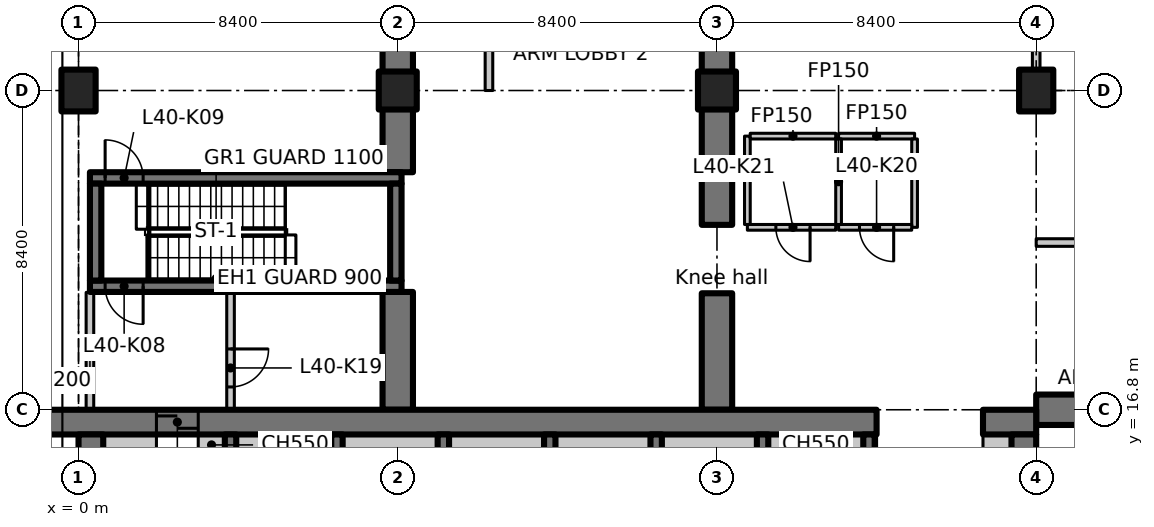
"""IFC4 building model, lengths in metres.
Left out: names, types, materials, properties, quantities, classifications, styles, units other than length and angle.
Written with IfcOpenShell. Run it as: python <this file> out.ifc"""

import sys

from ifc_helpers import new_model, si_unit, direction, frame, frame_2d, origin, origin_2d, place, context, subcontext, project, spatial, polyline, rectangle, outline, extrude, element, fill, save


model = new_model("IFC4")
c1 = context("Model", 3, precision=1e-05, world=origin(), true_north=direction((0.0, 1.0)))
c2 = subcontext(c1, "Body", "Model", "MODEL_VIEW")
j1 = project(units=[si_unit("LENGTHUNIT", "METRE"), si_unit("PLANEANGLEUNIT", "RADIAN")], contexts=[c1])
p1 = place(None, origin())
s1 = spatial("IfcSite", under=j1, at=p1, CompositionType="ELEMENT")
p2 = place(p1, origin())
s2 = spatial("IfcBuilding", under=s1, at=p2, CompositionType="ELEMENT")
p3 = place(p2, frame((0.0, 0.0, 162.0)))
s3 = spatial("IfcBuildingStorey", under=s2, at=p3, CompositionType="ELEMENT", Elevation=162.0)
p4 = place(p3, frame((0.0, 25.2, 0.0), z_axis=(0.0, 0.0, 1.0), x_axis=(1.0, 0.0, 0.0)))
e1 = element("IfcColumn", 1, at=p4, inside=s3, PredefinedType="COLUMN", context=c2, shape_type="SweptSolid", body=[
    extrude(rectangle(XDim=0.9, YDim=1.1, at=origin_2d()), origin(), (0.0, 0.0, 1.0), 4.55),
])
for number, where, z_axis, x_axis in (
    (2, (8.4, 25.2, 0.0), (0.0, 0.0, 1.0), (1.0, 0.0, 0.0)),
    (3, (16.8, 25.2, 0.0), (0.0, 0.0, 1.0), (1.0, 0.0, 0.0)),
):
    element("IfcColumn", number, at=place(p3, frame(where, z_axis=z_axis, x_axis=x_axis)), inside=s3, PredefinedType="COLUMN", context=c2, shape_type="SweptSolid", body=[
        extrude(rectangle(XDim=1.0, YDim=1.0, at=origin_2d()), origin(), (0.0, 0.0, 1.0), 4.55),
    ])
p5 = place(p3, frame((25.2, 25.2, 0.0), z_axis=(0.0, 0.0, 1.0), x_axis=(1.0, 0.0, 0.0)))
e4 = element("IfcColumn", 4, at=p5, inside=s3, PredefinedType="COLUMN", context=c2, shape_type="SweptSolid", body=[
    extrude(rectangle(XDim=0.9, YDim=1.1, at=origin_2d()), origin(), (0.0, 0.0, 1.0), 4.55),
])
p6 = place(p3, frame((25.2, 16.8, 0.0), z_axis=(0.0, 0.0, 1.0), x_axis=(1.0, 0.0, 0.0)))
e5 = element("IfcWall", 5, at=p6, inside=s3, PredefinedType="SHEAR", context=c2, shape_type="SweptSolid", body=[
    extrude(rectangle(XDim=3.065, YDim=0.8, at=frame_2d((1.532, 0.0))), origin(), (0.0, 0.0, 1.0), 4.55),
])
p7 = place(p3, frame((8.4, 16.8, 0.0), z_axis=(0.0, 0.0, 1.0), x_axis=(0.0, 1.0, 0.0)))
e6 = element("IfcWall", 6, at=p7, inside=s3, PredefinedType="SHEAR", context=c2, shape_type="SweptSolid", body=[
    extrude(rectangle(XDim=3.1, YDim=0.8, at=frame_2d((1.55, 0.0))), origin(), (0.0, 0.0, 1.0), 4.55),
])
p8 = place(p3, frame((8.4, 23.05, 0.0), z_axis=(0.0, 0.0, 1.0), x_axis=(0.0, 1.0, 0.0)))
e7 = element("IfcWall", 7, at=p8, inside=s3, PredefinedType="SHEAR", context=c2, shape_type="SweptSolid", body=[
    extrude(rectangle(XDim=1.68, YDim=0.8, at=frame_2d((0.84, 0.0))), origin(), (0.0, 0.0, 1.0), 4.55),
])
p9 = place(p3, frame((8.4, 25.67, 0.0), z_axis=(0.0, 0.0, 1.0), x_axis=(0.0, 1.0, 0.0)))
e8 = element("IfcWall", 8, at=p9, inside=s3, PredefinedType="SHEAR", context=c2, shape_type="SweptSolid", body=[
    extrude(rectangle(XDim=2.83, YDim=0.8, at=frame_2d((1.415, 0.0))), origin(), (0.0, 0.0, 1.0), 4.55),
])
for number, where, z_axis, x_axis in (
    (9, (16.8, 16.8, 0.0), (0.0, 0.0, 1.0), (0.0, 1.0, 0.0)),
    (10, (16.8, 21.665, 0.0), (0.0, 0.0, 1.0), (0.0, 1.0, 0.0)),
):
    element("IfcWall", number, at=place(p3, frame(where, z_axis=z_axis, x_axis=x_axis)), inside=s3, PredefinedType="SHEAR", context=c2, shape_type="SweptSolid", body=[
        extrude(rectangle(XDim=3.065, YDim=0.8, at=frame_2d((1.532, 0.0))), origin(), (0.0, 0.0, 1.0), 4.55),
    ])
p10 = place(p3, frame((16.8, 25.67, 0.0), z_axis=(0.0, 0.0, 1.0), x_axis=(0.0, 1.0, 0.0)))
e11 = element("IfcWall", 11, at=p10, inside=s3, PredefinedType="SHEAR", context=c2, shape_type="SweptSolid", body=[
    extrude(rectangle(XDim=1.53, YDim=0.8, at=frame_2d((0.765, 0.0))), origin(), (0.0, 0.0, 1.0), 4.55),
])
p11 = place(p3, frame((-1.1, 16.475, 0.0), z_axis=(0.0, 0.0, 1.0), x_axis=(1.0, 0.0, 0.0)))
e12 = element("IfcWall", 12, at=p11, inside=s3, PredefinedType="SHEAR", context=c2, shape_type="SweptSolid", body=[
    extrude(rectangle(XDim=22.1, YDim=0.65, at=frame_2d((11.05, 0.0))), origin(), (0.0, 0.0, 1.0), 4.55),
])
p12 = place(p11, frame((3.15, 0.0, 0.0)))
e13 = element("IfcOpeningElement", 13, at=p12, cuts=e12, PredefinedType="OPENING", context=c2, shape_type="SweptSolid", body=[
    extrude(rectangle(XDim=1.1, YDim=2.3, at=frame_2d((0.55, 1.15))), frame((0.0, 0.335, 0.0), z_axis=(0.0, -1.0, 0.0), x_axis=(1.0, 0.0, 0.0)), (0.0, 0.0, 1.0), 0.67),
])
p13 = place(p3, frame((23.8, 16.475, 0.0), z_axis=(0.0, 0.0, 1.0), x_axis=(1.0, 0.0, 0.0)))
e14 = element("IfcWall", 14, at=p13, inside=s3, PredefinedType="SHEAR", context=c2, shape_type="SweptSolid", body=[
    extrude(rectangle(XDim=1.4, YDim=0.65, at=frame_2d((0.7, 0.0))), origin(), (0.0, 0.0, 1.0), 4.55),
])
p14 = place(p3, frame((0.325, 7.286, 0.0), z_axis=(0.0, 0.0, 1.0), x_axis=(0.0, 1.0, 0.0)))
e15 = element("IfcWall", 15, at=p14, inside=s3, PredefinedType="SHEAR", context=c2, shape_type="SweptSolid", body=[
    extrude(rectangle(XDim=8.864, YDim=0.65, at=frame_2d((4.432, 0.0))), origin(), (0.0, 0.0, 1.0), 4.55),
])
p15 = place(p3, frame((24.875, 12.6, 0.0), z_axis=(0.0, 0.0, 1.0), x_axis=(0.0, 1.0, 0.0)))
e16 = element("IfcWall", 16, at=p15, inside=s3, PredefinedType="SHEAR", context=c2, shape_type="SweptSolid", body=[
    extrude(rectangle(XDim=3.55, YDim=0.65, at=frame_2d((1.775, 0.0))), origin(), (0.0, 0.0, 1.0), 4.55),
])
p16 = place(p3, frame((0.65, 15.875, 0.0), z_axis=(0.0, 0.0, 1.0), x_axis=(1.0, 0.0, 0.0)))
e17 = element("IfcWall", 17, at=p16, inside=s3, PredefinedType="PARTITIONING", context=c2, shape_type="SweptSolid", body=[
    extrude(rectangle(XDim=1.4, YDim=0.55, at=frame_2d((0.7, 0.0))), origin(), (0.0, 0.0, 1.0), 4.55),
])
p17 = place(p3, frame((23.8, 15.875, 0.0), z_axis=(0.0, 0.0, 1.0), x_axis=(1.0, 0.0, 0.0)))
e18 = element("IfcWall", 18, at=p17, inside=s3, PredefinedType="PARTITIONING", context=c2, shape_type="SweptSolid", body=[
    extrude(rectangle(XDim=0.75, YDim=0.55, at=frame_2d((0.375, 0.0))), origin(), (0.0, 0.0, 1.0), 4.55),
])
for number, where, z_axis, x_axis in (
    (19, (4.0, 12.95, 0.0), (0.0, 0.0, 1.0), (0.0, 1.0, 0.0)),
    (20, (6.8, 12.95, 0.0), (0.0, 0.0, 1.0), (0.0, 1.0, 0.0)),
    (21, (9.6, 12.95, 0.0), (0.0, 0.0, 1.0), (0.0, 1.0, 0.0)),
    (22, (12.4, 12.95, 0.0), (0.0, 0.0, 1.0), (0.0, 1.0, 0.0)),
    (23, (15.2, 12.95, 0.0), (0.0, 0.0, 1.0), (0.0, 1.0, 0.0)),
    (24, (18.0, 12.95, 0.0), (0.0, 0.0, 1.0), (0.0, 1.0, 0.0)),
    (25, (20.8, 12.95, 0.0), (0.0, 0.0, 1.0), (0.0, 1.0, 0.0)),
):
    element("IfcWall", number, at=place(p3, frame(where, z_axis=z_axis, x_axis=x_axis)), inside=s3, PredefinedType="SHEAR", context=c2, shape_type="SweptSolid", body=[
        extrude(rectangle(XDim=3.2, YDim=0.3, at=frame_2d((1.6, 0.0))), origin(), (0.0, 0.0, 1.0), 4.55),
    ])
p18 = place(p3, frame((8.5, 20.05, 0.0), z_axis=(0.0, 0.0, 1.0), x_axis=(-1.0, 0.0, 0.0)))
e26 = element("IfcWall", 26, at=p18, inside=s3, PredefinedType="SHEAR", context=c2, shape_type="SweptSolid", body=[
    extrude(rectangle(XDim=8.2, YDim=0.3, at=frame_2d((4.1, 0.0))), origin(), (0.0, 0.0, 1.0), 4.55),
])
p19 = place(p18, frame((6.8, 0.0, 0.0)))
e27 = element("IfcOpeningElement", 27, at=p19, cuts=e26, PredefinedType="OPENING", context=c2, shape_type="SweptSolid", body=[
    extrude(rectangle(XDim=1.0, YDim=2.1, at=frame_2d((0.5, 1.05))), frame((0.0, 0.16, 0.0), z_axis=(0.0, -1.0, 0.0), x_axis=(1.0, 0.0, 0.0)), (0.0, 0.0, 1.0), 0.32),
])
p20 = place(p3, frame((0.3, 22.9, 0.0), z_axis=(0.0, 0.0, 1.0), x_axis=(1.0, 0.0, 0.0)))
e28 = element("IfcWall", 28, at=p20, inside=s3, PredefinedType="SHEAR", context=c2, shape_type="SweptSolid", body=[
    extrude(rectangle(XDim=8.2, YDim=0.3, at=frame_2d((4.1, 0.0))), origin(), (0.0, 0.0, 1.0), 4.55),
])
p21 = place(p20, frame((0.4, 0.0, 0.0)))
e29 = element("IfcOpeningElement", 29, at=p21, cuts=e28, PredefinedType="OPENING", context=c2, shape_type="SweptSolid", body=[
    extrude(rectangle(XDim=1.0, YDim=2.1, at=frame_2d((0.5, 1.05))), frame((0.0, 0.16, 0.0), z_axis=(0.0, -1.0, 0.0), x_axis=(1.0, 0.0, 0.0)), (0.0, 0.0, 1.0), 0.32),
])
for number, where, z_axis, x_axis in (
    (30, (0.45, 20.2, 0.0), (0.0, 0.0, 1.0), (0.0, 1.0, 0.0)),
    (31, (8.35, 20.2, 0.0), (0.0, 0.0, 1.0), (0.0, 1.0, 0.0)),
):
    element("IfcWall", number, at=place(p3, frame(where, z_axis=z_axis, x_axis=x_axis)), inside=s3, PredefinedType="SHEAR", context=c2, shape_type="SweptSolid", body=[
        extrude(rectangle(XDim=2.55, YDim=0.3, at=frame_2d((1.275, 0.0))), origin(), (0.0, 0.0, 1.0), 4.55),
    ])
p22 = place(p3, frame((0.3, 16.812, 0.0), z_axis=(0.0, 0.0, 1.0), x_axis=(0.0, 1.0, 0.0)))
e32 = element("IfcWall", 32, at=p22, inside=s3, PredefinedType="PARTITIONING", context=c2, shape_type="SweptSolid", body=[
    extrude(rectangle(XDim=3.076, YDim=0.2, at=frame_2d((1.538, 0.0))), origin(), (0.0, 0.0, 1.0), 4.18),
])
p23 = place(p3, frame((4.0, 19.888, 0.0), z_axis=(0.0, 0.0, 1.0), x_axis=(0.0, -1.0, 0.0)))
e33 = element("IfcWall", 33, at=p23, inside=s3, PredefinedType="PARTITIONING", context=c2, shape_type="SweptSolid", body=[
    extrude(rectangle(XDim=3.076, YDim=0.2, at=frame_2d((1.538, 0.0))), origin(), (0.0, 0.0, 1.0), 4.55),
])
p24 = place(p23, frame((1.488, 0.0, 0.0)))
e34 = element("IfcOpeningElement", 34, at=p24, cuts=e33, PredefinedType="OPENING", context=c2, shape_type="SweptSolid", body=[
    extrude(rectangle(XDim=1.0, YDim=2.1, at=frame_2d((0.5, 1.05))), frame((0.0, 0.11, 0.0), z_axis=(0.0, -1.0, 0.0), x_axis=(1.0, 0.0, 0.0)), (0.0, 0.0, 1.0), 0.22),
])
p25 = place(p3, frame((20.0, 24.0, 0.0), z_axis=(0.0, 0.0, 1.0), x_axis=(1.0, 0.0, 0.0)))
e35 = element("IfcWall", 35, at=p25, inside=s3, PredefinedType="PARTITIONING", context=c2, shape_type="SweptSolid", body=[
    extrude(rectangle(XDim=2.0, YDim=0.15, at=frame_2d((1.0, 0.0))), origin(), (0.0, 0.0, 1.0), 4.55),
])
p26 = place(p3, frame((22.0, 23.925, 0.0), z_axis=(0.0, 0.0, 1.0), x_axis=(0.0, -1.0, 0.0)))
e36 = element("IfcWall", 36, at=p26, inside=s3, PredefinedType="PARTITIONING", context=c2, shape_type="SweptSolid", body=[
    extrude(rectangle(XDim=2.325, YDim=0.15, at=frame_2d((1.163, 0.0))), origin(), (0.0, 0.0, 1.0), 4.55),
])
p27 = place(p3, frame((21.925, 21.6, 0.0), z_axis=(0.0, 0.0, 1.0), x_axis=(-1.0, 0.0, 0.0)))
e37 = element("IfcWall", 37, at=p27, inside=s3, PredefinedType="PARTITIONING", context=c2, shape_type="SweptSolid", body=[
    extrude(rectangle(XDim=1.925, YDim=0.15, at=frame_2d((0.962, 0.0))), origin(), (0.0, 0.0, 1.0), 4.55),
])
p28 = place(p27, frame((0.475, 0.0, 0.0)))
e38 = element("IfcOpeningElement", 38, at=p28, cuts=e37, PredefinedType="OPENING", context=c2, shape_type="SweptSolid", body=[
    extrude(rectangle(XDim=0.9, YDim=2.1, at=frame_2d((0.45, 1.05))), frame((0.0, 0.085, 0.0), z_axis=(0.0, -1.0, 0.0), x_axis=(1.0, 0.0, 0.0)), (0.0, 0.0, 1.0), 0.17),
])
p29 = place(p3, frame((20.0, 21.675, 0.0), z_axis=(0.0, 0.0, 1.0), x_axis=(0.0, 1.0, 0.0)))
e39 = element("IfcWall", 39, at=p29, inside=s3, PredefinedType="PARTITIONING", context=c2, shape_type="SweptSolid", body=[
    extrude(rectangle(XDim=2.25, YDim=0.15, at=frame_2d((1.125, 0.0))), origin(), (0.0, 0.0, 1.0), 4.55),
])
p30 = place(p3, frame((19.925, 21.6, 0.0), z_axis=(0.0, 0.0, 1.0), x_axis=(-1.0, 0.0, 0.0)))
e40 = element("IfcWall", 40, at=p30, inside=s3, PredefinedType="PARTITIONING", context=c2, shape_type="SweptSolid", body=[
    extrude(rectangle(XDim=2.325, YDim=0.15, at=frame_2d((1.163, 0.0))), origin(), (0.0, 0.0, 1.0), 4.55),
])
p31 = place(p30, frame((0.675, 0.0, 0.0)))
e41 = element("IfcOpeningElement", 41, at=p31, cuts=e40, PredefinedType="OPENING", context=c2, shape_type="SweptSolid", body=[
    extrude(rectangle(XDim=0.9, YDim=2.1, at=frame_2d((0.45, 1.05))), frame((0.0, 0.085, 0.0), z_axis=(0.0, -1.0, 0.0), x_axis=(1.0, 0.0, 0.0)), (0.0, 0.0, 1.0), 0.17),
])
p32 = place(p3, frame((17.6, 21.675, 0.0), z_axis=(0.0, 0.0, 1.0), x_axis=(0.0, 1.0, 0.0)))
e42 = element("IfcWall", 42, at=p32, inside=s3, PredefinedType="PARTITIONING", context=c2, shape_type="SweptSolid", body=[
    extrude(rectangle(XDim=2.325, YDim=0.15, at=frame_2d((1.163, 0.0))), origin(), (0.0, 0.0, 1.0), 4.55),
])
p33 = place(p3, frame((17.675, 24.0, 0.0), z_axis=(0.0, 0.0, 1.0), x_axis=(1.0, 0.0, 0.0)))
e43 = element("IfcWall", 43, at=p33, inside=s3, PredefinedType="PARTITIONING", context=c2, shape_type="SweptSolid", body=[
    extrude(rectangle(XDim=2.25, YDim=0.15, at=frame_2d((1.125, 0.0))), origin(), (0.0, 0.0, 1.0), 4.55),
])
p34 = place(p3, frame((3.15, 15.875, 0.0), z_axis=(0.0, 0.0, 1.0), x_axis=(1.0, 0.0, 0.0)))
e44 = element("IfcWall", 44, at=p34, inside=s3, PredefinedType="PARTITIONING", context=c2, shape_type="SweptSolid", body=[
    extrude(rectangle(XDim=0.7, YDim=0.55, at=frame_2d((0.35, 0.0))), origin(), (0.0, 0.0, 1.0), 4.55),
])
for number, where, z_axis, x_axis in (
    (45, (4.15, 15.875, 0.0), (0.0, 0.0, 1.0), (1.0, 0.0, 0.0)),
    (46, (6.95, 15.875, 0.0), (0.0, 0.0, 1.0), (1.0, 0.0, 0.0)),
    (47, (9.75, 15.875, 0.0), (0.0, 0.0, 1.0), (1.0, 0.0, 0.0)),
    (48, (12.55, 15.875, 0.0), (0.0, 0.0, 1.0), (1.0, 0.0, 0.0)),
    (49, (15.35, 15.875, 0.0), (0.0, 0.0, 1.0), (1.0, 0.0, 0.0)),
    (50, (18.15, 15.875, 0.0), (0.0, 0.0, 1.0), (1.0, 0.0, 0.0)),
):
    element("IfcWall", number, at=place(p3, frame(where, z_axis=z_axis, x_axis=x_axis)), inside=s3, PredefinedType="PARTITIONING", context=c2, shape_type="SweptSolid", body=[
        extrude(rectangle(XDim=2.5, YDim=0.55, at=frame_2d((1.25, 0.0))), origin(), (0.0, 0.0, 1.0), 4.55),
    ])
p35 = place(p3, frame((20.95, 15.875, 0.0), z_axis=(0.0, 0.0, 1.0), x_axis=(1.0, 0.0, 0.0)))
e51 = element("IfcWall", 51, at=p35, inside=s3, PredefinedType="PARTITIONING", context=c2, shape_type="SweptSolid", body=[
    extrude(rectangle(XDim=0.05, YDim=0.55, at=frame_2d((0.025, 0.0))), origin(), (0.0, 0.0, 1.0), 4.55),
])
p36 = place(p3, frame((25.2, 21.2, 0.0), z_axis=(0.0, 0.0, 1.0), x_axis=(1.0, 0.0, 0.0)))
e52 = element("IfcWall", 52, at=p36, inside=s3, PredefinedType="PARTITIONING", context=c2, shape_type="SweptSolid", body=[
    extrude(rectangle(XDim=4.2, YDim=0.2, at=frame_2d((2.1, 0.0))), origin(), (0.0, 0.0, 1.0), 4.53),
])
p37 = place(p3, frame((25.2, 31.0, 0.0), z_axis=(0.0, 0.0, 1.0), x_axis=(0.0, -1.0, 0.0)))
e53 = element("IfcWall", 53, at=p37, inside=s3, PredefinedType="PARTITIONING", context=c2, shape_type="SweptSolid", body=[
    extrude(outline(polyline([(0.0, 0.0), (5.23, 0.0), (5.23, 4.18), (0.0, 4.18), (0.0, 0.0)])), frame((0.0, 0.1, 0.0), z_axis=(0.0, -1.0, 0.0), x_axis=(1.0, 0.0, 0.0)), (0.0, 0.0, 1.0), 0.2),
])
p38 = place(p37, frame((2.73, 0.0, 0.0)))
e54 = element("IfcOpeningElement", 54, at=p38, cuts=e53, PredefinedType="OPENING", context=c2, shape_type="SweptSolid", body=[
    extrude(rectangle(XDim=1.0, YDim=2.1, at=frame_2d((0.5, 1.05))), frame((0.0, 0.11, 0.0), z_axis=(0.0, -1.0, 0.0), x_axis=(1.0, 0.0, 0.0)), (0.0, 0.0, 1.0), 0.22),
])
p39 = place(p3, frame((10.8, 25.2, 0.0), z_axis=(0.0, 0.0, 1.0), x_axis=(0.0, 1.0, 0.0)))
e55 = element("IfcWall", 55, at=p39, inside=s3, PredefinedType="PARTITIONING", context=c2, shape_type="SweptSolid", body=[
    extrude(rectangle(XDim=8.4, YDim=0.2, at=frame_2d((4.2, 0.0))), origin(), (0.0, 0.0, 1.0), 4.53),
])
p40 = place(p39, frame((3.3, 0.0, 0.0)))
e56 = element("IfcOpeningElement", 56, at=p40, cuts=e55, PredefinedType="OPENING", context=c2, shape_type="SweptSolid", body=[
    extrude(rectangle(XDim=1.8, YDim=2.1, at=frame_2d((0.9, 1.05))), frame((0.0, 0.11, 0.0), z_axis=(0.0, -1.0, 0.0), x_axis=(1.0, 0.0, 0.0)), (0.0, 0.0, 1.0), 0.22),
])
p41 = place(p12, origin())
e57 = element("IfcDoor", 57, at=p41, inside=s3, OperationType="SLIDING_TO_LEFT", PredefinedType="DOOR", context=c2, shape_type="SweptSolid", body=[
    extrude(rectangle(XDim=1.1, YDim=2.3, at=frame_2d((0.55, 1.15))), frame((0.0, 0.025, 0.0), z_axis=(0.0, -1.0, 0.0), x_axis=(1.0, 0.0, 0.0)), (0.0, 0.0, 1.0), 0.05),
])
fill(e13, e57)
p42 = place(p19, origin())
e58 = element("IfcDoor", 58, at=p42, inside=s3, OperationType="SINGLE_SWING_RIGHT", PredefinedType="DOOR", context=c2, shape_type="SweptSolid", body=[
    extrude(rectangle(XDim=1.0, YDim=2.1, at=frame_2d((0.5, 1.05))), frame((0.0, 0.025, 0.0), z_axis=(0.0, -1.0, 0.0), x_axis=(1.0, 0.0, 0.0)), (0.0, 0.0, 1.0), 0.05),
])
fill(e27, e58)
p43 = place(p21, origin())
e59 = element("IfcDoor", 59, at=p43, inside=s3, OperationType="SINGLE_SWING_LEFT", PredefinedType="DOOR", context=c2, shape_type="SweptSolid", body=[
    extrude(rectangle(XDim=1.0, YDim=2.1, at=frame_2d((0.5, 1.05))), frame((0.0, 0.025, 0.0), z_axis=(0.0, -1.0, 0.0), x_axis=(1.0, 0.0, 0.0)), (0.0, 0.0, 1.0), 0.05),
])
fill(e29, e59)
p44 = place(p24, origin())
e60 = element("IfcDoor", 60, at=p44, inside=s3, OperationType="SINGLE_SWING_LEFT", PredefinedType="DOOR", context=c2, shape_type="SweptSolid", body=[
    extrude(rectangle(XDim=1.0, YDim=2.1, at=frame_2d((0.5, 1.05))), frame((0.0, 0.025, 0.0), z_axis=(0.0, -1.0, 0.0), x_axis=(1.0, 0.0, 0.0)), (0.0, 0.0, 1.0), 0.05),
])
fill(e34, e60)
p45 = place(p28, origin())
e61 = element("IfcDoor", 61, at=p45, inside=s3, OperationType="SINGLE_SWING_RIGHT", PredefinedType="DOOR", context=c2, shape_type="SweptSolid", body=[
    extrude(rectangle(XDim=0.9, YDim=2.1, at=frame_2d((0.45, 1.05))), frame((0.0, 0.025, 0.0), z_axis=(0.0, -1.0, 0.0), x_axis=(1.0, 0.0, 0.0)), (0.0, 0.0, 1.0), 0.05),
])
fill(e38, e61)
p46 = place(p31, origin())
e62 = element("IfcDoor", 62, at=p46, inside=s3, OperationType="SINGLE_SWING_LEFT", PredefinedType="DOOR", context=c2, shape_type="SweptSolid", body=[
    extrude(rectangle(XDim=0.9, YDim=2.1, at=frame_2d((0.45, 1.05))), frame((0.0, 0.025, 0.0), z_axis=(0.0, -1.0, 0.0), x_axis=(1.0, 0.0, 0.0)), (0.0, 0.0, 1.0), 0.05),
])
fill(e41, e62)
save(model, sys.argv[1])
